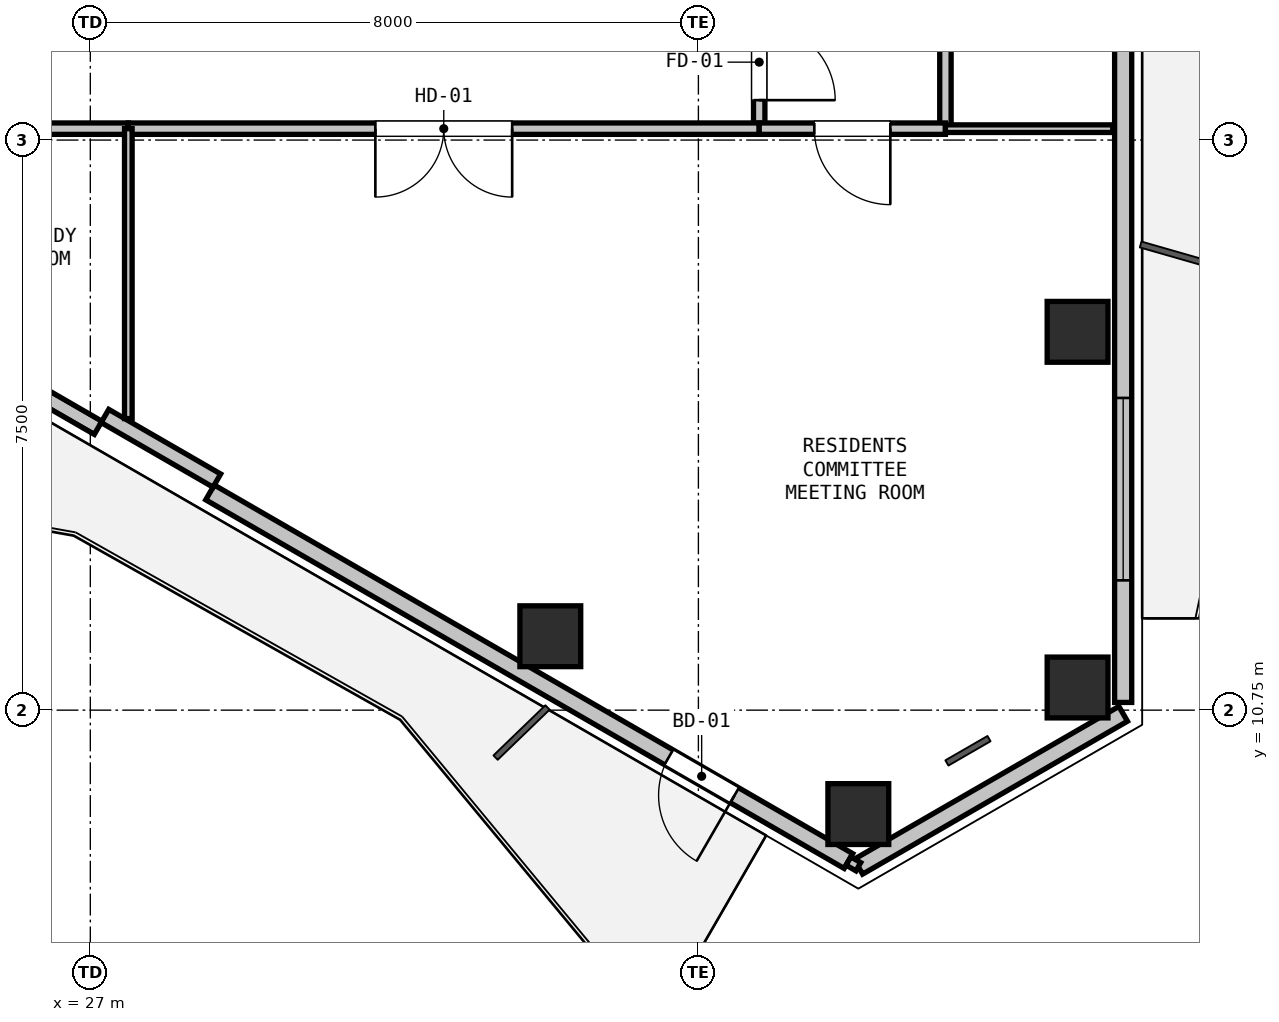
"""IFC4 building model, lengths in metres.
Left out: names, types, materials, properties, quantities, classifications, styles, units other than length and angle.
Written with IfcOpenShell. Run it as: python <this file> out.ifc"""

import sys

from ifc_helpers import new_model, si_unit, direction, frame, frame_2d, origin, origin_2d, place, context, subcontext, project, spatial, rectangle, hollow_rectangle, extrude, element, fill, save


model = new_model("IFC4")
c1 = context("Model", 3, precision=1e-05, world=origin(), true_north=direction((0.0, 1.0)))
c2 = subcontext(c1, "Body", "Model", "MODEL_VIEW")
j1 = project(units=[si_unit("LENGTHUNIT", "METRE"), si_unit("PLANEANGLEUNIT", "RADIAN")], contexts=[c1])
p1 = place(None, origin())
s1 = spatial("IfcSite", under=j1, at=p1, CompositionType="ELEMENT")
p2 = place(p1, origin())
s2 = spatial("IfcBuilding", under=s1, at=p2, CompositionType="ELEMENT")
p3 = place(p2, frame((0.0, 0.0, 218.4)))
s3 = spatial("IfcBuildingStorey", under=s2, at=p3, CompositionType="ELEMENT", Elevation=218.4)
for number, where, z_axis, x_axis in (
    (1, (39.988, 15.727, 0.0), (0.0, 0.0, 1.0), (1.0, 0.0, 0.0)),
    (2, (39.988, 11.048, 0.0), (0.0, 0.0, 1.0), (1.0, 0.0, 0.0)),
    (3, (37.104, 9.383, 0.0), (0.0, 0.0, 1.0), (1.0, 0.0, 0.0)),
    (4, (33.052, 11.722, 0.0), (0.0, 0.0, 1.0), (1.0, 0.0, 0.0)),
):
    element("IfcColumn", number, at=place(p3, frame(where, z_axis=z_axis, x_axis=x_axis)), inside=s3, PredefinedType="COLUMN", context=c2, shape_type="SweptSolid", body=[
        extrude(hollow_rectangle(XDim=0.8, YDim=0.8, WallThickness=0.025, at=origin_2d()), origin(), (0.0, 0.0, 1.0), 3.23),
    ])
p4 = place(p3, frame((40.588, 10.702, 0.0), z_axis=(0.0, 0.0, 1.0), x_axis=(-0.866023907196, -0.500002592159, 0.0)))
e5 = element("IfcWall", 5, at=p4, inside=s3, PredefinedType="SOLIDWALL", context=c2, shape_type="SweptSolid", body=[
    extrude(rectangle(XDim=4.023, YDim=0.225, at=frame_2d((2.012, 0.0))), origin(), (0.0, 0.0, 1.0), 4.2),
])
p5 = place(p3, frame((40.588, 20.551, 0.0), z_axis=(0.0, 0.0, 1.0), x_axis=(0.0, -1.0, 0.0)))
e6 = element("IfcWall", 6, at=p5, inside=s3, PredefinedType="SOLIDWALL", context=c2, shape_type="SweptSolid", body=[
    extrude(rectangle(XDim=9.699, YDim=0.225, at=frame_2d((4.85, 0.0))), origin(), (0.0, 0.0, 1.0), 3.215),
])
p6 = place(p5, frame((5.693, 0.0, 0.9)))
e7 = element("IfcOpeningElement", 7, at=p6, cuts=e6, PredefinedType="OPENING", context=c2, shape_type="SweptSolid", body=[
    extrude(rectangle(XDim=2.4, YDim=2.2, at=frame_2d((1.2, 1.1))), frame((0.0, 0.123, 0.0), z_axis=(0.0, -1.0, 0.0), x_axis=(1.0, 0.0, 0.0)), (0.0, 0.0, 1.0), 0.245),
])
p7 = place(p3, frame((36.974, 8.765, 0.0), z_axis=(0.0, 0.0, 1.0), x_axis=(-0.866016233231, 0.500015883528, 0.0)))
e8 = element("IfcWall", 8, at=p7, inside=s3, PredefinedType="SOLIDWALL", context=c2, shape_type="SweptSolid", body=[
    extrude(rectangle(XDim=9.699, YDim=0.225, at=frame_2d((4.85, 0.0))), origin(), (0.0, 0.0, 1.0), 3.215),
])
p8 = place(p7, frame((1.73, 0.0, 0.0)))
e9 = element("IfcOpeningElement", 9, at=p8, cuts=e8, PredefinedType="OPENING", context=c2, shape_type="SweptSolid", body=[
    extrude(rectangle(XDim=1.0, YDim=2.1, at=frame_2d((0.5, 1.05))), frame((0.0, 0.123, 0.0), z_axis=(0.0, -1.0, 0.0), x_axis=(1.0, 0.0, 0.0)), (0.0, 0.0, 1.0), 0.245),
])
p9 = place(p3, frame((27.102, 14.464, 0.0), z_axis=(0.0, 0.0, 1.0), x_axis=(-0.866020680503, 0.500008180874, 0.0)))
e10 = element("IfcWall", 10, at=p9, inside=s3, PredefinedType="PARAPET", context=c2, shape_type="SweptSolid", body=[
    extrude(rectangle(XDim=8.999, YDim=0.2, at=frame_2d((4.5, 0.0))), origin(), (0.0, 0.0, 1.0), 0.2),
])
p10 = place(p3, frame((28.665, 13.77, 0.0), z_axis=(0.0, 0.0, 1.0), x_axis=(-0.866025371046, 0.500000056704, 0.0)))
e11 = element("IfcWall", 11, at=p10, inside=s3, PredefinedType="PARAPET", context=c2, shape_type="SweptSolid", body=[
    extrude(rectangle(XDim=1.7, YDim=0.2, at=frame_2d((0.85, 0.0))), origin(), (0.0, 0.0, 1.0), 4.2),
])
p11 = place(p3, frame((35.8, 20.15, 0.0), z_axis=(0.0, 0.0, 1.0), x_axis=(0.0, -1.0, 0.0)))
e12 = element("IfcWall", 12, at=p11, inside=s3, PredefinedType="PARTITIONING", context=c2, shape_type="SweptSolid", body=[
    extrude(rectangle(XDim=1.75, YDim=0.15, at=frame_2d((0.875, 0.0))), origin(), (0.0, 0.0, 1.0), 3.215),
])
p12 = place(p11, frame((0.375, 0.0, 0.0)))
e13 = element("IfcOpeningElement", 13, at=p12, cuts=e12, PredefinedType="OPENING", context=c2, shape_type="SweptSolid", body=[
    extrude(rectangle(XDim=1.0, YDim=2.15, at=frame_2d((0.5, 1.075))), frame((0.0, 0.085, 0.0), z_axis=(0.0, -1.0, 0.0), x_axis=(1.0, 0.0, 0.0)), (0.0, 0.0, 1.0), 0.17),
])
p13 = place(p3, frame((35.8, 18.4, 0.0), z_axis=(0.0, 0.0, 1.0), x_axis=(-1.0, 0.0, 0.0)))
e14 = element("IfcWall", 14, at=p13, inside=s3, PredefinedType="PARTITIONING", context=c2, shape_type="SweptSolid", body=[
    extrude(rectangle(XDim=8.3, YDim=0.15, at=frame_2d((4.15, 0.0))), origin(), (0.0, 0.0, 1.0), 3.215),
])
p14 = place(p13, frame((3.25, 0.0, 0.0)))
e15 = element("IfcOpeningElement", 15, at=p14, cuts=e14, PredefinedType="OPENING", context=c2, shape_type="SweptSolid", body=[
    extrude(rectangle(XDim=1.8, YDim=2.2, at=frame_2d((0.9, 1.1))), frame((0.0, 0.085, 0.0), z_axis=(0.0, -1.0, 0.0), x_axis=(1.0, 0.0, 0.0)), (0.0, 0.0, 1.0), 0.17),
])
p15 = place(p3, frame((27.5, 18.4, 0.0), z_axis=(0.0, 0.0, 1.0), x_axis=(-1.0, 0.0, 0.0)))
e16 = element("IfcWall", 16, at=p15, inside=s3, PredefinedType="PARTITIONING", context=c2, shape_type="SweptSolid", body=[
    extrude(rectangle(XDim=7.138, YDim=0.15, at=frame_2d((3.569, 0.0))), origin(), (0.0, 0.0, 1.0), 2.365),
])
p16 = place(p15, frame((3.069, 0.0, 0.0)))
e17 = element("IfcOpeningElement", 17, at=p16, cuts=e16, PredefinedType="OPENING", context=c2, shape_type="SweptSolid", body=[
    extrude(rectangle(XDim=1.0, YDim=2.15, at=frame_2d((0.5, 1.075))), frame((0.0, 0.085, 0.0), z_axis=(0.0, -1.0, 0.0), x_axis=(1.0, 0.0, 0.0)), (0.0, 0.0, 1.0), 0.17),
])
p17 = place(p3, frame((38.25, 35.1, 0.0), z_axis=(0.0, 0.0, 1.0), x_axis=(0.0, -1.0, 0.0)))
e18 = element("IfcWall", 18, at=p17, inside=s3, PredefinedType="PARTITIONING", context=c2, shape_type="SweptSolid", body=[
    extrude(rectangle(XDim=16.7, YDim=0.15, at=frame_2d((8.35, 0.0))), origin(), (0.0, 0.0, 1.0), 3.215),
])
p18 = place(p17, frame((7.85, 0.0, 0.0)))
e19 = element("IfcOpeningElement", 19, at=p18, cuts=e18, PredefinedType="OPENING", context=c2, shape_type="SweptSolid", body=[
    extrude(rectangle(XDim=1.0, YDim=2.15, at=frame_2d((0.5, 1.075))), frame((0.0, 0.085, 0.0), z_axis=(0.0, -1.0, 0.0), x_axis=(1.0, 0.0, 0.0)), (0.0, 0.0, 1.0), 0.17),
])
p19 = place(p3, frame((38.25, 18.4, 0.0), z_axis=(0.0, 0.0, 1.0), x_axis=(-1.0, 0.0, 0.0)))
e20 = element("IfcWall", 20, at=p19, inside=s3, PredefinedType="PARTITIONING", context=c2, shape_type="SweptSolid", body=[
    extrude(rectangle(XDim=2.45, YDim=0.15, at=frame_2d((1.225, 0.0))), origin(), (0.0, 0.0, 1.0), 3.215),
])
p20 = place(p19, frame((0.725, 0.0, 0.0)))
e21 = element("IfcOpeningElement", 21, at=p20, cuts=e20, PredefinedType="OPENING", context=c2, shape_type="SweptSolid", body=[
    extrude(rectangle(XDim=1.0, YDim=2.15, at=frame_2d((0.5, 1.075))), frame((0.0, 0.085, 0.0), z_axis=(0.0, -1.0, 0.0), x_axis=(1.0, 0.0, 0.0)), (0.0, 0.0, 1.0), 0.17),
])
p21 = place(p3, frame((40.452, 18.4, 0.0), z_axis=(0.0, 0.0, 1.0), x_axis=(-1.0, 0.0, 0.0)))
e22 = element("IfcWall", 22, at=p21, inside=s3, PredefinedType="PARTITIONING", context=c2, shape_type="SweptSolid", body=[
    extrude(rectangle(XDim=2.202, YDim=0.1, at=frame_2d((1.101, 0.0))), origin(), (0.0, 0.0, 1.0), 2.365),
])
p22 = place(p3, frame((37.104, 8.69, 0.0), z_axis=(0.0, 0.0, 1.0), x_axis=(-0.866131372301, 0.499816412211, 0.0)))
e23 = element("IfcWall", 23, at=p22, inside=s3, PredefinedType="PARTITIONING", context=c2, shape_type="SweptSolid", body=[
    extrude(rectangle(XDim=0.15, YDim=0.125, at=frame_2d((0.075, 0.0))), origin(), (0.0, 0.0, 1.0), 4.58),
])
p23 = place(p3, frame((27.5, 14.586, 0.0), z_axis=(0.0, 0.0, 1.0), x_axis=(0.0, 1.0, 0.0)))
e24 = element("IfcWall", 24, at=p23, inside=s3, PredefinedType="PARTITIONING", context=c2, shape_type="SweptSolid", body=[
    extrude(rectangle(XDim=3.814, YDim=0.1, at=frame_2d((1.907, 0.0))), origin(), (0.0, 0.0, 1.0), 2.365),
])
p24 = place(p6, origin())
e25 = element("IfcWindow", 25, at=p24, inside=s3, PartitioningType="SINGLE_PANEL", PredefinedType="WINDOW", context=c2, shape_type="SweptSolid", body=[
    extrude(rectangle(XDim=2.4, YDim=2.2, at=frame_2d((1.2, 1.1))), frame((0.0, 0.03, 0.0), z_axis=(0.0, -1.0, 0.0), x_axis=(1.0, 0.0, 0.0)), (0.0, 0.0, 1.0), 0.06),
])
fill(e7, e25)
p25 = place(p8, origin())
e26 = element("IfcDoor", 26, at=p25, inside=s3, OperationType="SINGLE_SWING_LEFT", PredefinedType="DOOR", context=c2, shape_type="SweptSolid", body=[
    extrude(rectangle(XDim=1.0, YDim=2.1, at=frame_2d((0.5, 1.05))), frame((0.0, 0.025, 0.0), z_axis=(0.0, -1.0, 0.0), x_axis=(1.0, 0.0, 0.0)), (0.0, 0.0, 1.0), 0.05),
])
fill(e9, e26)
p26 = place(p12, origin())
e27 = element("IfcDoor", 27, at=p26, inside=s3, OperationType="SINGLE_SWING_RIGHT", PredefinedType="DOOR", context=c2, shape_type="SweptSolid", body=[
    extrude(rectangle(XDim=1.0, YDim=2.15, at=frame_2d((0.5, 1.075))), frame((0.0, 0.025, 0.0), z_axis=(0.0, -1.0, 0.0), x_axis=(1.0, 0.0, 0.0)), (0.0, 0.0, 1.0), 0.05),
])
fill(e13, e27)
p27 = place(p14, origin())
e28 = element("IfcDoor", 28, at=p27, inside=s3, OperationType="DOUBLE_DOOR_SINGLE_SWING", PredefinedType="DOOR", context=c2, shape_type="SweptSolid", body=[
    extrude(rectangle(XDim=1.8, YDim=2.2, at=frame_2d((0.9, 1.1))), frame((0.0, 0.025, 0.0), z_axis=(0.0, -1.0, 0.0), x_axis=(1.0, 0.0, 0.0)), (0.0, 0.0, 1.0), 0.05),
])
fill(e15, e28)
p28 = place(p20, origin())
e29 = element("IfcDoor", 29, at=p28, inside=s3, OperationType="SINGLE_SWING_LEFT", PredefinedType="DOOR", context=c2, shape_type="SweptSolid", body=[
    extrude(rectangle(XDim=1.0, YDim=2.15, at=frame_2d((0.5, 1.075))), frame((0.0, 0.025, 0.0), z_axis=(0.0, -1.0, 0.0), x_axis=(1.0, 0.0, 0.0)), (0.0, 0.0, 1.0), 0.05),
])
fill(e21, e29)
save(model, sys.argv[1])
